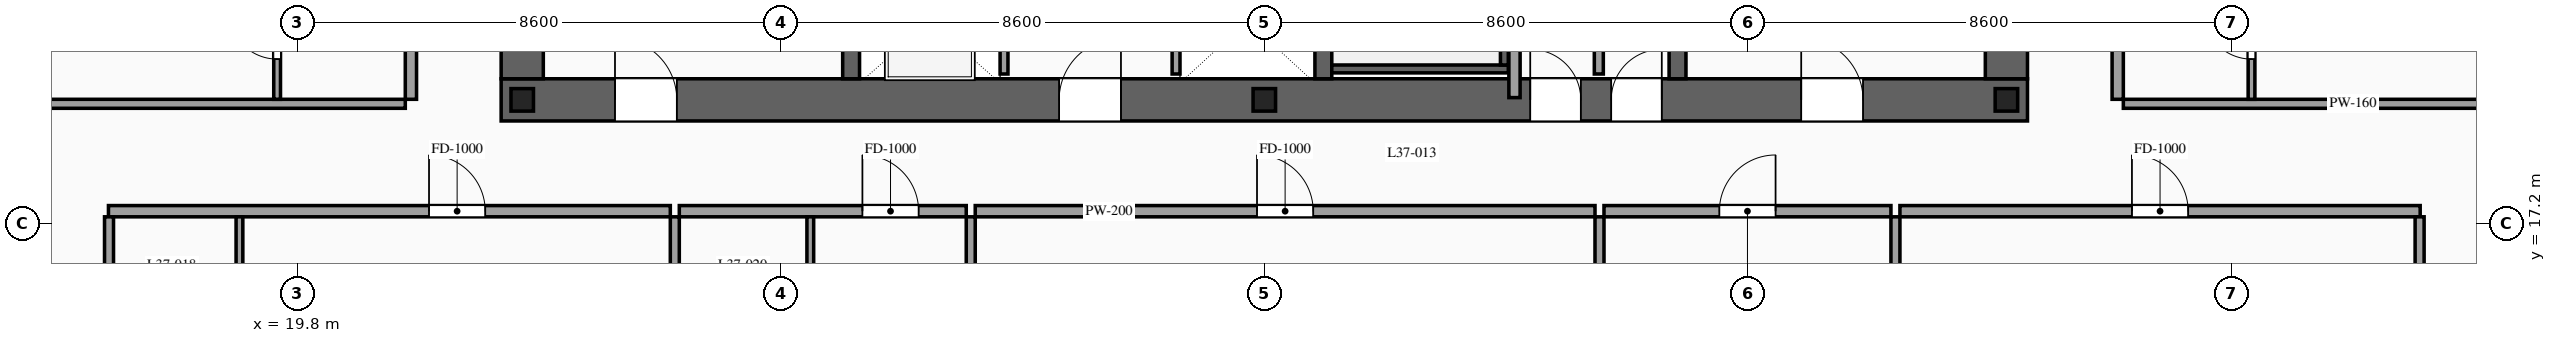
"""IFC4 building model, lengths in metres.
Left out: names, types, materials, properties, quantities, classifications, styles, units other than length and angle.
Written with IfcOpenShell. Run it as: python <this file> out.ifc"""

import sys

from ifc_helpers import new_model, si_unit, direction, frame, frame_2d, origin, origin_2d, place, context, subcontext, project, spatial, rectangle, i_section, extrude, source, transform, mapped, element, fill, save


model = new_model("IFC4")
c1 = context("Model", 3, precision=1e-05, world=origin(), true_north=direction((0.0, 1.0)))
c2 = subcontext(c1, "Body", "Model", "MODEL_VIEW")
j1 = project(units=[si_unit("LENGTHUNIT", "METRE"), si_unit("PLANEANGLEUNIT", "RADIAN")], contexts=[c1])
p1 = place(None, origin())
s1 = spatial("IfcSite", under=j1, at=p1, CompositionType="ELEMENT")
p2 = place(p1, origin())
s2 = spatial("IfcBuilding", under=s1, at=p2, CompositionType="ELEMENT")
p3 = place(p2, frame((0.0, 0.0, 141.6)))
s3 = spatial("IfcBuildingStorey", under=s2, at=p3, CompositionType="ELEMENT", Elevation=141.6)
p4 = place(p3, frame((23.425, 19.4, 0.0), z_axis=(0.0, 0.0, 1.0), x_axis=(1.0, 0.0, 0.0)))
e1 = element("IfcWall", 1, at=p4, inside=s3, PredefinedType="SHEAR", context=c2, shape_type="SweptSolid", body=[
    extrude(rectangle(XDim=27.15, YDim=0.75, at=frame_2d((13.575, 0.0))), origin(), (0.0, 0.0, 1.0), 3.6),
])
p5 = place(p4, frame((2.025, 0.0, 0.0)))
e2 = element("IfcOpeningElement", 2, at=p5, cuts=e1, PredefinedType="OPENING", context=c2, shape_type="SweptSolid", body=[
    extrude(rectangle(XDim=1.1, YDim=2.2, at=frame_2d((0.55, 1.1))), frame((0.0, 0.39, 0.0), z_axis=(0.0, -1.0, 0.0), x_axis=(1.0, 0.0, 0.0)), (0.0, 0.0, 1.0), 0.78),
])
p6 = place(p4, frame((9.925, 0.0, 0.0)))
e3 = element("IfcOpeningElement", 3, at=p6, cuts=e1, PredefinedType="OPENING", context=c2, shape_type="SweptSolid", body=[
    extrude(rectangle(XDim=1.1, YDim=2.2, at=frame_2d((0.55, 1.1))), frame((0.0, 0.39, 0.0), z_axis=(0.0, -1.0, 0.0), x_axis=(1.0, 0.0, 0.0)), (0.0, 0.0, 1.0), 0.78),
])
p7 = place(p4, frame((23.125, 0.0, 0.0)))
e4 = element("IfcOpeningElement", 4, at=p7, cuts=e1, PredefinedType="OPENING", context=c2, shape_type="SweptSolid", body=[
    extrude(rectangle(XDim=1.1, YDim=2.2, at=frame_2d((0.55, 1.1))), frame((0.0, 0.39, 0.0), z_axis=(0.0, -1.0, 0.0), x_axis=(1.0, 0.0, 0.0)), (0.0, 0.0, 1.0), 0.78),
])
p8 = place(p4, frame((19.745, 0.0, 0.0)))
e5 = element("IfcOpeningElement", 5, at=p8, cuts=e1, PredefinedType="OPENING", context=c2, shape_type="SweptSolid", body=[
    extrude(rectangle(XDim=0.9, YDim=2.15, at=frame_2d((0.45, 1.075))), frame((0.0, 0.39, 0.0), z_axis=(0.0, -1.0, 0.0), x_axis=(1.0, 0.0, 0.0)), (0.0, 0.0, 1.0), 0.78),
])
p9 = place(p4, frame((18.305, 0.0, 0.0)))
e6 = element("IfcOpeningElement", 6, at=p9, cuts=e1, PredefinedType="OPENING", context=c2, shape_type="SweptSolid", body=[
    extrude(rectangle(XDim=0.9, YDim=2.15, at=frame_2d((0.45, 1.075))), frame((0.0, 0.39, 0.0), z_axis=(0.0, -1.0, 0.0), x_axis=(1.0, 0.0, 0.0)), (0.0, 0.0, 1.0), 0.78),
])
m1 = source(origin(), c2, "Body", "SweptSolid", [
    extrude(rectangle(XDim=12.05, YDim=0.75, at=frame_2d((6.025, 0.0))), origin(), (0.0, 0.0, 1.0), 3.6),
])
for number, where, z_axis, x_axis in (
    (7, (23.8, 19.775, 0.0), (0.0, 0.0, 1.0), (0.0, 1.0, 0.0)),
    (8, (50.2, 19.775, 0.0), (0.0, 0.0, 1.0), (0.0, 1.0, 0.0)),
):
    element("IfcWall", number, at=place(p3, frame(where, z_axis=z_axis, x_axis=x_axis)), inside=s3, PredefinedType="SHEAR", context=c2, shape_type="MappedRepresentation", body=[
        mapped(m1, transform((0.0, 0.0, 0.0), scale=1.0)),
    ])
m2 = source(origin(), c2, "Body", "SweptSolid", [
    extrude(rectangle(XDim=12.05, YDim=0.3, at=frame_2d((6.025, 0.0))), origin(), (0.0, 0.0, 1.0), 3.6),
])
for number, where, z_axis, x_axis in (
    (9, (29.65, 19.775, 0.0), (0.0, 0.0, 1.0), (0.0, 1.0, 0.0)),
    (10, (38.05, 19.775, 0.0), (0.0, 0.0, 1.0), (0.0, 1.0, 0.0)),
    (11, (44.35, 19.775, 0.0), (0.0, 0.0, 1.0), (0.0, 1.0, 0.0)),
):
    element("IfcWall", number, at=place(p3, frame(where, z_axis=z_axis, x_axis=x_axis)), inside=s3, PredefinedType="SOLIDWALL", context=c2, shape_type="MappedRepresentation", body=[
        mapped(m2, transform((0.0, 0.0, 0.0), scale=1.0)),
    ])
m3 = source(origin(), c2, "Body", "SweptSolid", [
    extrude(i_section(OverallWidth=0.4, OverallDepth=0.4, WebThickness=0.013, FlangeThickness=0.021, at=origin_2d()), origin(), (0.0, 0.0, 1.0), 3.6),
])
for number, where, z_axis, x_axis in (
    (12, (23.8, 19.4, 0.0), (0.0, 0.0, 1.0), (1.0, 0.0, 0.0)),
    (13, (37.0, 19.4, 0.0), (0.0, 0.0, 1.0), (1.0, 0.0, 0.0)),
    (14, (50.2, 19.4, 0.0), (0.0, 0.0, 1.0), (1.0, 0.0, 0.0)),
):
    element("IfcColumn", number, at=place(p3, frame(where, z_axis=z_axis, x_axis=x_axis)), inside=s3, PredefinedType="COLUMN", context=c2, shape_type="MappedRepresentation", body=[
        mapped(m3, transform((0.0, 0.0, 0.0), scale=1.0)),
    ])
p10 = place(p3, frame((32.37, 19.86, 0.0), z_axis=(0.0, 0.0, 1.0), x_axis=(0.0, 1.0, 0.0)))
e15 = element("IfcWall", 15, at=p10, inside=s3, PredefinedType="SOLIDWALL", context=c2, shape_type="SweptSolid", body=[
    extrude(rectangle(XDim=2.04, YDim=0.14, at=frame_2d((1.02, 0.0))), origin(), (0.0, 0.0, 1.0), 3.38),
])
p11 = place(p10, frame((0.47, 0.0, 0.0)))
e16 = element("IfcOpeningElement", 16, at=p11, cuts=e15, PredefinedType="OPENING", context=c2, shape_type="SweptSolid", body=[
    extrude(rectangle(XDim=1.1, YDim=2.2, at=frame_2d((0.55, 1.1))), frame((0.0, 0.085, 0.0), z_axis=(0.0, -1.0, 0.0), x_axis=(1.0, 0.0, 0.0)), (0.0, 0.0, 1.0), 0.17),
])
m4 = source(origin(), c2, "Body", "SweptSolid", [
    extrude(rectangle(XDim=2.04, YDim=0.14, at=frame_2d((1.02, 0.0))), origin(), (0.0, 0.0, 1.0), 3.38),
])
p12 = place(p3, frame((35.43, 19.86, 0.0), z_axis=(0.0, 0.0, 1.0), x_axis=(0.0, 1.0, 0.0)))
e17 = element("IfcWall", 17, at=p12, inside=s3, PredefinedType="SOLIDWALL", context=c2, shape_type="MappedRepresentation", body=[
    mapped(m4, transform((0.0, 0.0, 0.0), scale=1.0)),
])
m5 = source(origin(), c2, "Body", "SweptSolid", [
    extrude(rectangle(XDim=3.14, YDim=0.14, at=frame_2d((1.57, 0.0))), origin(), (0.0, 0.0, 1.0), 3.38),
])
p13 = place(p3, frame((38.2, 19.95, 0.0), z_axis=(0.0, 0.0, 1.0), x_axis=(1.0, 0.0, 0.0)))
e18 = element("IfcWall", 18, at=p13, inside=s3, PredefinedType="SOLIDWALL", context=c2, shape_type="MappedRepresentation", body=[
    mapped(m5, transform((0.0, 0.0, 0.0), scale=1.0)),
])
m6 = source(origin(), c2, "Body", "SweptSolid", [
    extrude(rectangle(XDim=8.94, YDim=0.14, at=frame_2d((4.47, 0.0))), origin(), (0.0, 0.0, 1.0), 3.38),
])
p14 = place(p3, frame((41.27, 20.02, 0.0), z_axis=(0.0, 0.0, 1.0), x_axis=(0.0, 1.0, 0.0)))
e19 = element("IfcWall", 19, at=p14, inside=s3, PredefinedType="SOLIDWALL", context=c2, shape_type="MappedRepresentation", body=[
    mapped(m6, transform((0.0, 0.0, 0.0), scale=1.0)),
])
m7 = source(origin(), c2, "Body", "SweptSolid", [
    extrude(rectangle(XDim=1.34, YDim=0.16, at=frame_2d((0.67, 0.0))), origin(), (0.0, 0.0, 1.0), 3.38),
])
p15 = place(p3, frame((42.95, 19.86, 0.0), z_axis=(0.0, 0.0, 1.0), x_axis=(0.0, 1.0, 0.0)))
e20 = element("IfcWall", 20, at=p15, inside=s3, PredefinedType="PARTITIONING", context=c2, shape_type="MappedRepresentation", body=[
    mapped(m7, transform((0.0, 0.0, 0.0), scale=1.0)),
])
m8 = source(origin(), c2, "Body", "SweptSolid", [
    extrude(rectangle(XDim=6.51, YDim=0.2, at=frame_2d((3.255, 0.0))), origin(), (0.0, 0.0, 1.0), 3.38),
])
p16 = place(p3, frame((41.45, 19.44, 0.0), z_axis=(0.0, 0.0, 1.0), x_axis=(0.0, 1.0, 0.0)))
e21 = element("IfcWall", 21, at=p16, inside=s3, PredefinedType="PARTITIONING", context=c2, shape_type="MappedRepresentation", body=[
    mapped(m8, transform((0.0, 0.0, 0.0), scale=1.0)),
])
p17 = place(p3, frame((16.44, 17.42, 0.0), z_axis=(0.0, 0.0, 1.0), x_axis=(1.0, 0.0, 0.0)))
e22 = element("IfcWall", 22, at=p17, inside=s3, PredefinedType="PARTITIONING", context=c2, shape_type="SweptSolid", body=[
    extrude(rectangle(XDim=9.994, YDim=0.2, at=frame_2d((4.997, 0.0))), origin(), (0.0, 0.0, 1.0), 3.38),
])
p18 = place(p17, frame((5.702, 0.0, 0.0)))
e23 = element("IfcOpeningElement", 23, at=p18, cuts=e22, PredefinedType="OPENING", context=c2, shape_type="SweptSolid", body=[
    extrude(rectangle(XDim=1.0, YDim=2.2, at=frame_2d((0.5, 1.1))), frame((0.0, 0.115, 0.0), z_axis=(0.0, -1.0, 0.0), x_axis=(1.0, 0.0, 0.0)), (0.0, 0.0, 1.0), 0.23),
])
m9 = source(origin(), c2, "Body", "SweptSolid", [
    extrude(rectangle(XDim=14.97, YDim=0.16, at=frame_2d((7.485, 0.0))), origin(), (0.0, 0.0, 1.0), 3.38),
])
p19 = place(p3, frame((26.514, 2.35, 0.0), z_axis=(0.0, 0.0, 1.0), x_axis=(0.0, 1.0, 0.0)))
e24 = element("IfcWall", 24, at=p19, inside=s3, PredefinedType="PARTITIONING", context=c2, shape_type="MappedRepresentation", body=[
    mapped(m9, transform((0.0, 0.0, 0.0), scale=1.0)),
])
m10 = source(origin(), c2, "Body", "SweptSolid", [
    extrude(rectangle(XDim=2.42, YDim=0.12, at=frame_2d((1.21, 0.0))), origin(), (0.0, 0.0, 1.0), 3.38),
])
p20 = place(p3, frame((18.77, 14.9, 0.0), z_axis=(0.0, 0.0, 1.0), x_axis=(0.0, 1.0, 0.0)))
e25 = element("IfcWall", 25, at=p20, inside=s3, PredefinedType="PARTITIONING", context=c2, shape_type="MappedRepresentation", body=[
    mapped(m10, transform((0.0, 0.0, 0.0), scale=1.0)),
])
p21 = place(p3, frame((26.594, 17.42, 0.0), z_axis=(0.0, 0.0, 1.0), x_axis=(1.0, 0.0, 0.0)))
e26 = element("IfcWall", 26, at=p21, inside=s3, PredefinedType="PARTITIONING", context=c2, shape_type="SweptSolid", body=[
    extrude(rectangle(XDim=5.104, YDim=0.2, at=frame_2d((2.552, 0.0))), origin(), (0.0, 0.0, 1.0), 3.38),
])
p22 = place(p21, frame((3.257, 0.0, 0.0)))
e27 = element("IfcOpeningElement", 27, at=p22, cuts=e26, PredefinedType="OPENING", context=c2, shape_type="SweptSolid", body=[
    extrude(rectangle(XDim=1.0, YDim=2.2, at=frame_2d((0.5, 1.1))), frame((0.0, 0.115, 0.0), z_axis=(0.0, -1.0, 0.0), x_axis=(1.0, 0.0, 0.0)), (0.0, 0.0, 1.0), 0.23),
])
p23 = place(p3, frame((31.778, 2.35, 0.0), z_axis=(0.0, 0.0, 1.0), x_axis=(0.0, 1.0, 0.0)))
e28 = element("IfcWall", 28, at=p23, inside=s3, PredefinedType="PARTITIONING", context=c2, shape_type="MappedRepresentation", body=[
    mapped(m9, transform((0.0, 0.0, 0.0), scale=1.0)),
])
p24 = place(p3, frame((28.924, 14.9, 0.0), z_axis=(0.0, 0.0, 1.0), x_axis=(0.0, 1.0, 0.0)))
e29 = element("IfcWall", 29, at=p24, inside=s3, PredefinedType="PARTITIONING", context=c2, shape_type="MappedRepresentation", body=[
    mapped(m10, transform((0.0, 0.0, 0.0), scale=1.0)),
])
p25 = place(p3, frame((31.858, 17.42, 0.0), z_axis=(0.0, 0.0, 1.0), x_axis=(1.0, 0.0, 0.0)))
e30 = element("IfcWall", 30, at=p25, inside=s3, PredefinedType="PARTITIONING", context=c2, shape_type="SweptSolid", body=[
    extrude(rectangle(XDim=11.024, YDim=0.2, at=frame_2d((5.512, 0.0))), origin(), (0.0, 0.0, 1.0), 3.38),
])
p26 = place(p25, frame((5.012, 0.0, 0.0)))
e31 = element("IfcOpeningElement", 31, at=p26, cuts=e30, PredefinedType="OPENING", context=c2, shape_type="SweptSolid", body=[
    extrude(rectangle(XDim=1.0, YDim=2.2, at=frame_2d((0.5, 1.1))), frame((0.0, 0.115, 0.0), z_axis=(0.0, -1.0, 0.0), x_axis=(1.0, 0.0, 0.0)), (0.0, 0.0, 1.0), 0.23),
])
p27 = place(p3, frame((42.962, 2.35, 0.0), z_axis=(0.0, 0.0, 1.0), x_axis=(0.0, 1.0, 0.0)))
e32 = element("IfcWall", 32, at=p27, inside=s3, PredefinedType="PARTITIONING", context=c2, shape_type="MappedRepresentation", body=[
    mapped(m9, transform((0.0, 0.0, 0.0), scale=1.0)),
])
p28 = place(p3, frame((43.042, 17.42, 0.0), z_axis=(0.0, 0.0, 1.0), x_axis=(1.0, 0.0, 0.0)))
e33 = element("IfcWall", 33, at=p28, inside=s3, PredefinedType="PARTITIONING", context=c2, shape_type="SweptSolid", body=[
    extrude(rectangle(XDim=5.104, YDim=0.2, at=frame_2d((2.552, 0.0))), origin(), (0.0, 0.0, 1.0), 3.38),
])
p29 = place(p28, frame((2.052, 0.0, 0.0)))
e34 = element("IfcOpeningElement", 34, at=p29, cuts=e33, PredefinedType="OPENING", context=c2, shape_type="SweptSolid", body=[
    extrude(rectangle(XDim=1.0, YDim=2.2, at=frame_2d((0.5, 1.1))), frame((0.0, 0.115, 0.0), z_axis=(0.0, -1.0, 0.0), x_axis=(1.0, 0.0, 0.0)), (0.0, 0.0, 1.0), 0.23),
])
p30 = place(p3, frame((48.226, 2.35, 0.0), z_axis=(0.0, 0.0, 1.0), x_axis=(0.0, 1.0, 0.0)))
e35 = element("IfcWall", 35, at=p30, inside=s3, PredefinedType="PARTITIONING", context=c2, shape_type="MappedRepresentation", body=[
    mapped(m9, transform((0.0, 0.0, 0.0), scale=1.0)),
])
p31 = place(p3, frame((48.306, 17.42, 0.0), z_axis=(0.0, 0.0, 1.0), x_axis=(1.0, 0.0, 0.0)))
e36 = element("IfcWall", 36, at=p31, inside=s3, PredefinedType="PARTITIONING", context=c2, shape_type="SweptSolid", body=[
    extrude(rectangle(XDim=9.254, YDim=0.2, at=frame_2d((4.627, 0.0))), origin(), (0.0, 0.0, 1.0), 3.38),
])
p32 = place(p31, frame((4.127, 0.0, 0.0)))
e37 = element("IfcOpeningElement", 37, at=p32, cuts=e36, PredefinedType="OPENING", context=c2, shape_type="SweptSolid", body=[
    extrude(rectangle(XDim=1.0, YDim=2.2, at=frame_2d((0.5, 1.1))), frame((0.0, 0.115, 0.0), z_axis=(0.0, -1.0, 0.0), x_axis=(1.0, 0.0, 0.0)), (0.0, 0.0, 1.0), 0.23),
])
m11 = source(origin(), c2, "Body", "SweptSolid", [
    extrude(rectangle(XDim=14.82, YDim=0.16, at=frame_2d((7.41, 0.0))), origin(), (0.0, 0.0, 1.0), 3.38),
])
for number, where, z_axis, x_axis in (
    (38, (16.45, 2.5, 0.0), (0.0, 0.0, 1.0), (0.0, 1.0, 0.0)),
    (39, (57.55, 2.5, 0.0), (0.0, 0.0, 1.0), (0.0, 1.0, 0.0)),
):
    element("IfcWall", number, at=place(p3, frame(where, z_axis=z_axis, x_axis=x_axis)), inside=s3, PredefinedType="PARTITIONING", context=c2, shape_type="MappedRepresentation", body=[
        mapped(m11, transform((0.0, 0.0, 0.0), scale=1.0)),
    ])
p33 = place(p3, frame((21.82, 19.41, 0.0), z_axis=(0.0, 0.0, 1.0), x_axis=(0.0, 1.0, 0.0)))
e40 = element("IfcWall", 40, at=p33, inside=s3, PredefinedType="PARTITIONING", context=c2, shape_type="SweptSolid", body=[
    extrude(rectangle(XDim=6.31, YDim=0.2, at=frame_2d((3.155, 0.0))), origin(), (0.0, 0.0, 1.0), 3.38),
])
p34 = place(p33, frame((3.835, 0.0, 0.0)))
e41 = element("IfcOpeningElement", 41, at=p34, cuts=e40, PredefinedType="OPENING", context=c2, shape_type="SweptSolid", body=[
    extrude(rectangle(XDim=1.0, YDim=2.2, at=frame_2d((0.5, 1.1))), frame((0.0, 0.115, 0.0), z_axis=(0.0, -1.0, 0.0), x_axis=(1.0, 0.0, 0.0)), (0.0, 0.0, 1.0), 0.23),
])
m12 = source(origin(), c2, "Body", "SweptSolid", [
    extrude(rectangle(XDim=8.17, YDim=0.16, at=frame_2d((4.085, 0.0))), origin(), (0.0, 0.0, 1.0), 2.875),
])
p35 = place(p3, frame((13.55, 19.33, 0.0), z_axis=(0.0, 0.0, 1.0), x_axis=(1.0, 0.0, 0.0)))
e42 = element("IfcWall", 42, at=p35, inside=s3, PredefinedType="PARTITIONING", context=c2, shape_type="MappedRepresentation", body=[
    mapped(m12, transform((0.0, 0.0, 0.0), scale=1.0)),
])
p36 = place(p3, frame((19.44, 19.41, 0.0), z_axis=(0.0, 0.0, 1.0), x_axis=(0.0, 1.0, 0.0)))
e43 = element("IfcWall", 43, at=p36, inside=s3, PredefinedType="PARTITIONING", context=c2, shape_type="SweptSolid", body=[
    extrude(rectangle(XDim=2.28, YDim=0.12, at=frame_2d((1.14, 0.0))), origin(), (0.0, 0.0, 1.0), 3.38),
])
p37 = place(p36, frame((0.715, 0.0, 0.0)))
e44 = element("IfcOpeningElement", 44, at=p37, cuts=e43, PredefinedType="OPENING", context=c2, shape_type="SweptSolid", body=[
    extrude(rectangle(XDim=0.85, YDim=2.1, at=frame_2d((0.425, 1.05))), frame((0.0, 0.075, 0.0), z_axis=(0.0, -1.0, 0.0), x_axis=(1.0, 0.0, 0.0)), (0.0, 0.0, 1.0), 0.15),
])
p38 = place(p3, frame((52.18, 19.41, 0.0), z_axis=(0.0, 0.0, 1.0), x_axis=(0.0, 1.0, 0.0)))
e45 = element("IfcWall", 45, at=p38, inside=s3, PredefinedType="PARTITIONING", context=c2, shape_type="SweptSolid", body=[
    extrude(rectangle(XDim=6.31, YDim=0.2, at=frame_2d((3.155, 0.0))), origin(), (0.0, 0.0, 1.0), 3.38),
])
p39 = place(p38, frame((3.835, 0.0, 0.0)))
e46 = element("IfcOpeningElement", 46, at=p39, cuts=e45, PredefinedType="OPENING", context=c2, shape_type="SweptSolid", body=[
    extrude(rectangle(XDim=1.0, YDim=2.2, at=frame_2d((0.5, 1.1))), frame((0.0, 0.115, 0.0), z_axis=(0.0, -1.0, 0.0), x_axis=(1.0, 0.0, 0.0)), (0.0, 0.0, 1.0), 0.23),
])
p40 = place(p3, frame((52.28, 19.33, 0.0), z_axis=(0.0, 0.0, 1.0), x_axis=(1.0, 0.0, 0.0)))
e47 = element("IfcWall", 47, at=p40, inside=s3, PredefinedType="PARTITIONING", context=c2, shape_type="MappedRepresentation", body=[
    mapped(m12, transform((0.0, 0.0, 0.0), scale=1.0)),
])
p41 = place(p3, frame((54.56, 19.41, 0.0), z_axis=(0.0, 0.0, 1.0), x_axis=(0.0, 1.0, 0.0)))
e48 = element("IfcWall", 48, at=p41, inside=s3, PredefinedType="PARTITIONING", context=c2, shape_type="SweptSolid", body=[
    extrude(rectangle(XDim=2.28, YDim=0.12, at=frame_2d((1.14, 0.0))), origin(), (0.0, 0.0, 1.0), 3.38),
])
p42 = place(p41, frame((0.715, 0.0, 0.0)))
e49 = element("IfcOpeningElement", 49, at=p42, cuts=e48, PredefinedType="OPENING", context=c2, shape_type="SweptSolid", body=[
    extrude(rectangle(XDim=0.85, YDim=2.1, at=frame_2d((0.425, 1.05))), frame((0.0, 0.075, 0.0), z_axis=(0.0, -1.0, 0.0), x_axis=(1.0, 0.0, 0.0)), (0.0, 0.0, 1.0), 0.15),
])
m13 = source(origin(), c2, "Body", "SweptSolid", [
    extrude(rectangle(XDim=1.1, YDim=2.2, at=frame_2d((0.55, 1.1))), frame((0.0, 0.025, 0.0), z_axis=(0.0, -1.0, 0.0), x_axis=(1.0, 0.0, 0.0)), (0.0, 0.0, 1.0), 0.05),
])
p43 = place(p5, origin())
e50 = element("IfcDoor", 50, at=p43, inside=s3, OperationType="SINGLE_SWING_LEFT", PredefinedType="DOOR", context=c2, shape_type="MappedRepresentation", body=[
    mapped(m13, transform((0.0, 0.0, 0.0), scale=1.0)),
])
fill(e2, e50)
p44 = place(p6, origin())
e51 = element("IfcDoor", 51, at=p44, inside=s3, OperationType="SINGLE_SWING_RIGHT", PredefinedType="DOOR", context=c2, shape_type="MappedRepresentation", body=[
    mapped(m13, transform((0.0, 0.0, 0.0), scale=1.0)),
])
fill(e3, e51)
p45 = place(p7, origin())
e52 = element("IfcDoor", 52, at=p45, inside=s3, OperationType="SINGLE_SWING_LEFT", PredefinedType="DOOR", context=c2, shape_type="MappedRepresentation", body=[
    mapped(m13, transform((0.0, 0.0, 0.0), scale=1.0)),
])
fill(e4, e52)
m14 = source(origin(), c2, "Body", "SweptSolid", [
    extrude(rectangle(XDim=0.9, YDim=2.15, at=frame_2d((0.45, 1.075))), frame((0.0, 0.025, 0.0), z_axis=(0.0, -1.0, 0.0), x_axis=(1.0, 0.0, 0.0)), (0.0, 0.0, 1.0), 0.05),
])
p46 = place(p8, origin())
e53 = element("IfcDoor", 53, at=p46, inside=s3, OperationType="SINGLE_SWING_RIGHT", PredefinedType="DOOR", context=c2, shape_type="MappedRepresentation", body=[
    mapped(m14, transform((0.0, 0.0, 0.0), scale=1.0)),
])
fill(e5, e53)
p47 = place(p9, origin())
e54 = element("IfcDoor", 54, at=p47, inside=s3, OperationType="SINGLE_SWING_LEFT", PredefinedType="DOOR", context=c2, shape_type="MappedRepresentation", body=[
    mapped(m14, transform((0.0, 0.0, 0.0), scale=1.0)),
])
fill(e6, e54)
m15 = source(origin(), c2, "Body", "SweptSolid", [
    extrude(rectangle(XDim=1.0, YDim=2.2, at=frame_2d((0.5, 1.1))), frame((0.0, 0.025, 0.0), z_axis=(0.0, -1.0, 0.0), x_axis=(1.0, 0.0, 0.0)), (0.0, 0.0, 1.0), 0.05),
])
p48 = place(p18, origin())
e55 = element("IfcDoor", 55, at=p48, inside=s3, OperationType="SINGLE_SWING_LEFT", PredefinedType="DOOR", context=c2, shape_type="MappedRepresentation", body=[
    mapped(m15, transform((0.0, 0.0, 0.0), scale=1.0)),
])
fill(e23, e55)
p49 = place(p22, origin())
e56 = element("IfcDoor", 56, at=p49, inside=s3, OperationType="SINGLE_SWING_LEFT", PredefinedType="DOOR", context=c2, shape_type="MappedRepresentation", body=[
    mapped(m15, transform((0.0, 0.0, 0.0), scale=1.0)),
])
fill(e27, e56)
p50 = place(p26, origin())
e57 = element("IfcDoor", 57, at=p50, inside=s3, OperationType="SINGLE_SWING_LEFT", PredefinedType="DOOR", context=c2, shape_type="MappedRepresentation", body=[
    mapped(m15, transform((0.0, 0.0, 0.0), scale=1.0)),
])
fill(e31, e57)
p51 = place(p29, origin())
e58 = element("IfcDoor", 58, at=p51, inside=s3, OperationType="SINGLE_SWING_RIGHT", PredefinedType="DOOR", context=c2, shape_type="MappedRepresentation", body=[
    mapped(m15, transform((0.0, 0.0, 0.0), scale=1.0)),
])
fill(e34, e58)
p52 = place(p32, origin())
e59 = element("IfcDoor", 59, at=p52, inside=s3, OperationType="SINGLE_SWING_LEFT", PredefinedType="DOOR", context=c2, shape_type="MappedRepresentation", body=[
    mapped(m15, transform((0.0, 0.0, 0.0), scale=1.0)),
])
fill(e37, e59)
m16 = source(origin(), c2, "Body", "SweptSolid", [
    extrude(rectangle(XDim=0.85, YDim=2.1, at=frame_2d((0.425, 1.05))), frame((0.0, 0.025, 0.0), z_axis=(0.0, -1.0, 0.0), x_axis=(1.0, 0.0, 0.0)), (0.0, 0.0, 1.0), 0.05),
])
p53 = place(p37, origin())
e60 = element("IfcDoor", 60, at=p53, inside=s3, OperationType="SINGLE_SWING_RIGHT", PredefinedType="DOOR", context=c2, shape_type="MappedRepresentation", body=[
    mapped(m16, transform((0.0, 0.0, 0.0), scale=1.0)),
])
fill(e44, e60)
p54 = place(p42, origin())
e61 = element("IfcDoor", 61, at=p54, inside=s3, OperationType="SINGLE_SWING_RIGHT", PredefinedType="DOOR", context=c2, shape_type="MappedRepresentation", body=[
    mapped(m16, transform((0.0, 0.0, 0.0), scale=1.0)),
])
fill(e49, e61)
save(model, sys.argv[1])
